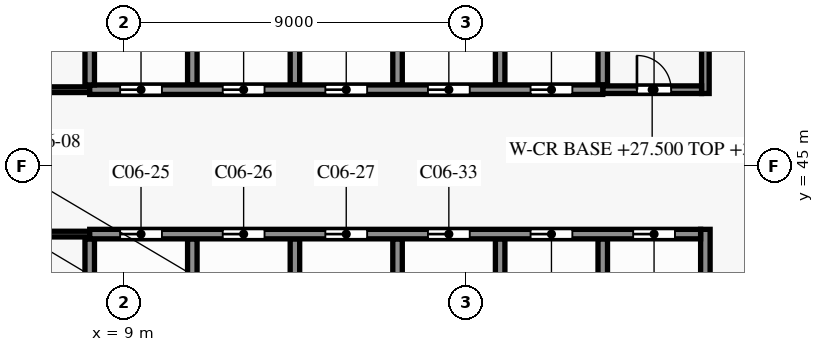
"""IFC4 building model, lengths in metres.
Left out: names, types, materials, properties, quantities, classifications, styles, units other than length and angle.
Written with IfcOpenShell. Run it as: python <this file> out.ifc"""

import sys

from ifc_helpers import new_model, si_unit, direction, frame, frame_2d, origin, place, context, subcontext, project, spatial, rectangle, extrude, element, fill, save


model = new_model("IFC4")
c1 = context("Model", 3, precision=1e-05, world=origin(), true_north=direction((0.0, 1.0)))
c2 = subcontext(c1, "Body", "Model", "MODEL_VIEW")
j1 = project(units=[si_unit("LENGTHUNIT", "METRE"), si_unit("PLANEANGLEUNIT", "RADIAN")], contexts=[c1])
p1 = place(None, origin())
s1 = spatial("IfcSite", under=j1, at=p1, CompositionType="ELEMENT")
p2 = place(p1, origin())
s2 = spatial("IfcBuilding", under=s1, at=p2, CompositionType="ELEMENT")
p3 = place(p2, frame((0.0, 0.0, 27.5)))
s3 = spatial("IfcBuildingStorey", under=s2, at=p3, CompositionType="ELEMENT", Elevation=27.5)
p4 = place(p3, frame((0.15, 43.2, 0.0), z_axis=(0.0, 0.0, 1.0), x_axis=(1.0, 0.0, 0.0)))
e1 = element("IfcWall", 1, at=p4, inside=s3, PredefinedType="PARTITIONING", context=c2, shape_type="SweptSolid", body=[
    extrude(rectangle(XDim=7.95, YDim=0.15, at=frame_2d((3.975, 0.0))), origin(), (0.0, 0.0, 1.0), 4.05),
])
p5 = place(p4, frame((1.975, 0.0, 0.0)))
e2 = element("IfcOpeningElement", 2, at=p5, cuts=e1, PredefinedType="OPENING", context=c2, shape_type="SweptSolid", body=[
    extrude(rectangle(XDim=0.9, YDim=2.1, at=frame_2d((0.45, 1.05))), frame((0.0, 0.085, 0.0), z_axis=(0.0, -1.0, 0.0), x_axis=(1.0, 0.0, 0.0)), (0.0, 0.0, 1.0), 0.17),
])
p6 = place(p4, frame((5.7, 0.0, 0.0)))
e3 = element("IfcOpeningElement", 3, at=p6, cuts=e1, PredefinedType="OPENING", context=c2, shape_type="SweptSolid", body=[
    extrude(rectangle(XDim=0.9, YDim=2.1, at=frame_2d((0.45, 1.05))), frame((0.0, 0.085, 0.0), z_axis=(0.0, -1.0, 0.0), x_axis=(1.0, 0.0, 0.0)), (0.0, 0.0, 1.0), 0.17),
])
p7 = place(p3, frame((8.1, 43.2, 0.0), z_axis=(0.0, 0.0, 1.0), x_axis=(1.0, 0.0, 0.0)))
e4 = element("IfcWall", 4, at=p7, inside=s3, PredefinedType="SHEAR", context=c2, shape_type="SweptSolid", body=[
    extrude(rectangle(XDim=16.075, YDim=0.25, at=frame_2d((8.038, 0.0))), origin(), (0.0, 0.0, 1.0), 4.2),
])
p8 = place(p7, frame((14.3, 0.0, 0.0)))
e5 = element("IfcOpeningElement", 5, at=p8, cuts=e4, PredefinedType="OPENING", context=c2, shape_type="SweptSolid", body=[
    extrude(rectangle(XDim=1.1, YDim=2.1, at=frame_2d((0.55, 1.05))), frame((0.0, 0.135, 0.0), z_axis=(0.0, -1.0, 0.0), x_axis=(1.0, 0.0, 0.0)), (0.0, 0.0, 1.0), 0.27),
])
p9 = place(p7, frame((0.8, 0.0, 0.0)))
e6 = element("IfcOpeningElement", 6, at=p9, cuts=e4, PredefinedType="OPENING", context=c2, shape_type="SweptSolid", body=[
    extrude(rectangle(XDim=1.1, YDim=2.1, at=frame_2d((0.55, 1.05))), frame((0.0, 0.135, 0.0), z_axis=(0.0, -1.0, 0.0), x_axis=(1.0, 0.0, 0.0)), (0.0, 0.0, 1.0), 0.27),
])
p10 = place(p7, frame((3.5, 0.0, 0.0)))
e7 = element("IfcOpeningElement", 7, at=p10, cuts=e4, PredefinedType="OPENING", context=c2, shape_type="SweptSolid", body=[
    extrude(rectangle(XDim=1.1, YDim=2.1, at=frame_2d((0.55, 1.05))), frame((0.0, 0.135, 0.0), z_axis=(0.0, -1.0, 0.0), x_axis=(1.0, 0.0, 0.0)), (0.0, 0.0, 1.0), 0.27),
])
p11 = place(p7, frame((6.2, 0.0, 0.0)))
e8 = element("IfcOpeningElement", 8, at=p11, cuts=e4, PredefinedType="OPENING", context=c2, shape_type="SweptSolid", body=[
    extrude(rectangle(XDim=1.1, YDim=2.1, at=frame_2d((0.55, 1.05))), frame((0.0, 0.135, 0.0), z_axis=(0.0, -1.0, 0.0), x_axis=(1.0, 0.0, 0.0)), (0.0, 0.0, 1.0), 0.27),
])
p12 = place(p7, frame((8.9, 0.0, 0.0)))
e9 = element("IfcOpeningElement", 9, at=p12, cuts=e4, PredefinedType="OPENING", context=c2, shape_type="SweptSolid", body=[
    extrude(rectangle(XDim=1.1, YDim=2.1, at=frame_2d((0.55, 1.05))), frame((0.0, 0.135, 0.0), z_axis=(0.0, -1.0, 0.0), x_axis=(1.0, 0.0, 0.0)), (0.0, 0.0, 1.0), 0.27),
])
p13 = place(p7, frame((11.6, 0.0, 0.0)))
e10 = element("IfcOpeningElement", 10, at=p13, cuts=e4, PredefinedType="OPENING", context=c2, shape_type="SweptSolid", body=[
    extrude(rectangle(XDim=1.1, YDim=2.1, at=frame_2d((0.55, 1.05))), frame((0.0, 0.135, 0.0), z_axis=(0.0, -1.0, 0.0), x_axis=(1.0, 0.0, 0.0)), (0.0, 0.0, 1.0), 0.27),
])
p14 = place(p3, frame((0.15, 47.0, 0.0), z_axis=(0.0, 0.0, 1.0), x_axis=(1.0, 0.0, 0.0)))
e11 = element("IfcWall", 11, at=p14, inside=s3, PredefinedType="PARTITIONING", context=c2, shape_type="SweptSolid", body=[
    extrude(rectangle(XDim=7.95, YDim=0.15, at=frame_2d((3.975, 0.0))), origin(), (0.0, 0.0, 1.0), 4.05),
])
p15 = place(p14, frame((1.975, 0.0, 0.0)))
e12 = element("IfcOpeningElement", 12, at=p15, cuts=e11, PredefinedType="OPENING", context=c2, shape_type="SweptSolid", body=[
    extrude(rectangle(XDim=0.9, YDim=2.1, at=frame_2d((0.45, 1.05))), frame((0.0, 0.085, 0.0), z_axis=(0.0, -1.0, 0.0), x_axis=(1.0, 0.0, 0.0)), (0.0, 0.0, 1.0), 0.17),
])
p16 = place(p14, frame((5.7, 0.0, 0.0)))
e13 = element("IfcOpeningElement", 13, at=p16, cuts=e11, PredefinedType="OPENING", context=c2, shape_type="SweptSolid", body=[
    extrude(rectangle(XDim=0.9, YDim=2.1, at=frame_2d((0.45, 1.05))), frame((0.0, 0.085, 0.0), z_axis=(0.0, -1.0, 0.0), x_axis=(1.0, 0.0, 0.0)), (0.0, 0.0, 1.0), 0.17),
])
p17 = place(p3, frame((21.6, 47.0, 0.0), z_axis=(0.0, 0.0, 1.0), x_axis=(1.0, 0.0, 0.0)))
e14 = element("IfcWall", 14, at=p17, inside=s3, PredefinedType="PARTITIONING", context=c2, shape_type="SweptSolid", body=[
    extrude(rectangle(XDim=2.6, YDim=0.2, at=frame_2d((1.3, 0.0))), origin(), (0.0, 0.0, 1.0), 4.05),
])
p18 = place(p17, frame((0.9, 0.0, 0.0)))
e15 = element("IfcOpeningElement", 15, at=p18, cuts=e14, PredefinedType="OPENING", context=c2, shape_type="SweptSolid", body=[
    extrude(rectangle(XDim=0.9, YDim=2.1, at=frame_2d((0.45, 1.05))), frame((0.0, 0.11, 0.0), z_axis=(0.0, -1.0, 0.0), x_axis=(1.0, 0.0, 0.0)), (0.0, 0.0, 1.0), 0.22),
])
p19 = place(p3, frame((8.1, 47.0, 0.0), z_axis=(0.0, 0.0, 1.0), x_axis=(1.0, 0.0, 0.0)))
e16 = element("IfcWall", 16, at=p19, inside=s3, PredefinedType="SHEAR", context=c2, shape_type="SweptSolid", body=[
    extrude(rectangle(XDim=13.5, YDim=0.25, at=frame_2d((6.75, 0.0))), origin(), (0.0, 0.0, 1.0), 4.2),
])
p20 = place(p19, frame((0.8, 0.0, 0.0)))
e17 = element("IfcOpeningElement", 17, at=p20, cuts=e16, PredefinedType="OPENING", context=c2, shape_type="SweptSolid", body=[
    extrude(rectangle(XDim=1.1, YDim=2.1, at=frame_2d((0.55, 1.05))), frame((0.0, 0.135, 0.0), z_axis=(0.0, -1.0, 0.0), x_axis=(1.0, 0.0, 0.0)), (0.0, 0.0, 1.0), 0.27),
])
p21 = place(p19, frame((3.5, 0.0, 0.0)))
e18 = element("IfcOpeningElement", 18, at=p21, cuts=e16, PredefinedType="OPENING", context=c2, shape_type="SweptSolid", body=[
    extrude(rectangle(XDim=1.1, YDim=2.1, at=frame_2d((0.55, 1.05))), frame((0.0, 0.135, 0.0), z_axis=(0.0, -1.0, 0.0), x_axis=(1.0, 0.0, 0.0)), (0.0, 0.0, 1.0), 0.27),
])
p22 = place(p19, frame((6.2, 0.0, 0.0)))
e19 = element("IfcOpeningElement", 19, at=p22, cuts=e16, PredefinedType="OPENING", context=c2, shape_type="SweptSolid", body=[
    extrude(rectangle(XDim=1.1, YDim=2.1, at=frame_2d((0.55, 1.05))), frame((0.0, 0.135, 0.0), z_axis=(0.0, -1.0, 0.0), x_axis=(1.0, 0.0, 0.0)), (0.0, 0.0, 1.0), 0.27),
])
p23 = place(p19, frame((8.9, 0.0, 0.0)))
e20 = element("IfcOpeningElement", 20, at=p23, cuts=e16, PredefinedType="OPENING", context=c2, shape_type="SweptSolid", body=[
    extrude(rectangle(XDim=1.1, YDim=2.1, at=frame_2d((0.55, 1.05))), frame((0.0, 0.135, 0.0), z_axis=(0.0, -1.0, 0.0), x_axis=(1.0, 0.0, 0.0)), (0.0, 0.0, 1.0), 0.27),
])
p24 = place(p19, frame((11.6, 0.0, 0.0)))
e21 = element("IfcOpeningElement", 21, at=p24, cuts=e16, PredefinedType="OPENING", context=c2, shape_type="SweptSolid", body=[
    extrude(rectangle(XDim=1.1, YDim=2.1, at=frame_2d((0.55, 1.05))), frame((0.0, 0.135, 0.0), z_axis=(0.0, -1.0, 0.0), x_axis=(1.0, 0.0, 0.0)), (0.0, 0.0, 1.0), 0.27),
])
for number, where, z_axis, x_axis in (
    (22, (8.1, 40.125, 0.0), (0.0, 0.0, 1.0), (0.0, 1.0, 0.0)),
    (23, (8.1, 47.125, 0.0), (0.0, 0.0, 1.0), (0.0, 1.0, 0.0)),
    (24, (10.8, 40.125, 0.0), (0.0, 0.0, 1.0), (0.0, 1.0, 0.0)),
    (25, (10.8, 47.125, 0.0), (0.0, 0.0, 1.0), (0.0, 1.0, 0.0)),
    (26, (13.5, 40.125, 0.0), (0.0, 0.0, 1.0), (0.0, 1.0, 0.0)),
    (27, (13.5, 47.125, 0.0), (0.0, 0.0, 1.0), (0.0, 1.0, 0.0)),
    (28, (16.2, 40.125, 0.0), (0.0, 0.0, 1.0), (0.0, 1.0, 0.0)),
    (29, (16.2, 47.125, 0.0), (0.0, 0.0, 1.0), (0.0, 1.0, 0.0)),
    (30, (18.9, 40.125, 0.0), (0.0, 0.0, 1.0), (0.0, 1.0, 0.0)),
    (31, (18.9, 47.125, 0.0), (0.0, 0.0, 1.0), (0.0, 1.0, 0.0)),
    (32, (21.6, 40.125, 0.0), (0.0, 0.0, 1.0), (0.0, 1.0, 0.0)),
):
    element("IfcWall", number, at=place(p3, frame(where, z_axis=z_axis, x_axis=x_axis)), inside=s3, PredefinedType="SHEAR", context=c2, shape_type="SweptSolid", body=[
        extrude(rectangle(XDim=2.95, YDim=0.25, at=frame_2d((1.475, 0.0))), origin(), (0.0, 0.0, 1.0), 4.2),
    ])
p25 = place(p3, frame((21.6, 47.125, 0.0), z_axis=(0.0, 0.0, 1.0), x_axis=(0.0, 1.0, 0.0)))
e33 = element("IfcWall", 33, at=p25, inside=s3, PredefinedType="SHEAR", context=c2, shape_type="SweptSolid", body=[
    extrude(rectangle(XDim=3.075, YDim=0.25, at=frame_2d((1.538, 0.0))), origin(), (0.0, 0.0, 1.0), 4.2),
])
p26 = place(p3, frame((24.3, 46.9, 0.0), z_axis=(0.0, 0.0, 1.0), x_axis=(0.0, 1.0, 0.0)))
e34 = element("IfcWall", 34, at=p26, inside=s3, PredefinedType="SHEAR", context=c2, shape_type="SweptSolid", body=[
    extrude(rectangle(XDim=5.0, YDim=0.2, at=frame_2d((2.5, 0.0))), origin(), (0.0, 0.0, 1.0), 4.2),
])
p27 = place(p3, frame((24.3, 40.0, 0.0), z_axis=(0.0, 0.0, 1.0), x_axis=(0.0, 1.0, 0.0)))
e35 = element("IfcWall", 35, at=p27, inside=s3, PredefinedType="SHEAR", context=c2, shape_type="SweptSolid", body=[
    extrude(rectangle(XDim=3.325, YDim=0.25, at=frame_2d((1.663, 0.0))), origin(), (0.0, 0.0, 1.0), 4.2),
])
p28 = place(p18, origin())
e36 = element("IfcDoor", 36, at=p28, inside=s3, OperationType="SINGLE_SWING_LEFT", PredefinedType="DOOR", context=c2, shape_type="SweptSolid", body=[
    extrude(rectangle(XDim=0.9, YDim=2.1, at=frame_2d((0.45, 1.05))), frame((0.0, 0.025, 0.0), z_axis=(0.0, -1.0, 0.0), x_axis=(1.0, 0.0, 0.0)), (0.0, 0.0, 1.0), 0.05),
])
fill(e15, e36)
p29 = place(p8, origin())
e37 = element("IfcDoor", 37, at=p29, inside=s3, OperationType="DOUBLE_DOOR_SLIDING", PredefinedType="DOOR", context=c2, shape_type="SweptSolid", body=[
    extrude(rectangle(XDim=1.1, YDim=2.1, at=frame_2d((0.55, 1.05))), frame((0.0, 0.025, 0.0), z_axis=(0.0, -1.0, 0.0), x_axis=(1.0, 0.0, 0.0)), (0.0, 0.0, 1.0), 0.05),
])
fill(e5, e37)
p30 = place(p9, origin())
e38 = element("IfcDoor", 38, at=p30, inside=s3, OperationType="DOUBLE_DOOR_SLIDING", PredefinedType="DOOR", context=c2, shape_type="SweptSolid", body=[
    extrude(rectangle(XDim=1.1, YDim=2.1, at=frame_2d((0.55, 1.05))), frame((0.0, 0.025, 0.0), z_axis=(0.0, -1.0, 0.0), x_axis=(1.0, 0.0, 0.0)), (0.0, 0.0, 1.0), 0.05),
])
fill(e6, e38)
p31 = place(p10, origin())
e39 = element("IfcDoor", 39, at=p31, inside=s3, OperationType="DOUBLE_DOOR_SLIDING", PredefinedType="DOOR", context=c2, shape_type="SweptSolid", body=[
    extrude(rectangle(XDim=1.1, YDim=2.1, at=frame_2d((0.55, 1.05))), frame((0.0, 0.025, 0.0), z_axis=(0.0, -1.0, 0.0), x_axis=(1.0, 0.0, 0.0)), (0.0, 0.0, 1.0), 0.05),
])
fill(e7, e39)
p32 = place(p11, origin())
e40 = element("IfcDoor", 40, at=p32, inside=s3, OperationType="DOUBLE_DOOR_SLIDING", PredefinedType="DOOR", context=c2, shape_type="SweptSolid", body=[
    extrude(rectangle(XDim=1.1, YDim=2.1, at=frame_2d((0.55, 1.05))), frame((0.0, 0.025, 0.0), z_axis=(0.0, -1.0, 0.0), x_axis=(1.0, 0.0, 0.0)), (0.0, 0.0, 1.0), 0.05),
])
fill(e8, e40)
p33 = place(p20, origin())
e41 = element("IfcDoor", 41, at=p33, inside=s3, OperationType="DOUBLE_DOOR_SLIDING", PredefinedType="DOOR", context=c2, shape_type="SweptSolid", body=[
    extrude(rectangle(XDim=1.1, YDim=2.1, at=frame_2d((0.55, 1.05))), frame((0.0, 0.025, 0.0), z_axis=(0.0, -1.0, 0.0), x_axis=(1.0, 0.0, 0.0)), (0.0, 0.0, 1.0), 0.05),
])
fill(e17, e41)
p34 = place(p21, origin())
e42 = element("IfcDoor", 42, at=p34, inside=s3, OperationType="DOUBLE_DOOR_SLIDING", PredefinedType="DOOR", context=c2, shape_type="SweptSolid", body=[
    extrude(rectangle(XDim=1.1, YDim=2.1, at=frame_2d((0.55, 1.05))), frame((0.0, 0.025, 0.0), z_axis=(0.0, -1.0, 0.0), x_axis=(1.0, 0.0, 0.0)), (0.0, 0.0, 1.0), 0.05),
])
fill(e18, e42)
p35 = place(p22, origin())
e43 = element("IfcDoor", 43, at=p35, inside=s3, OperationType="DOUBLE_DOOR_SLIDING", PredefinedType="DOOR", context=c2, shape_type="SweptSolid", body=[
    extrude(rectangle(XDim=1.1, YDim=2.1, at=frame_2d((0.55, 1.05))), frame((0.0, 0.025, 0.0), z_axis=(0.0, -1.0, 0.0), x_axis=(1.0, 0.0, 0.0)), (0.0, 0.0, 1.0), 0.05),
])
fill(e19, e43)
p36 = place(p23, origin())
e44 = element("IfcDoor", 44, at=p36, inside=s3, OperationType="DOUBLE_DOOR_SLIDING", PredefinedType="DOOR", context=c2, shape_type="SweptSolid", body=[
    extrude(rectangle(XDim=1.1, YDim=2.1, at=frame_2d((0.55, 1.05))), frame((0.0, 0.025, 0.0), z_axis=(0.0, -1.0, 0.0), x_axis=(1.0, 0.0, 0.0)), (0.0, 0.0, 1.0), 0.05),
])
fill(e20, e44)
p37 = place(p24, origin())
e45 = element("IfcDoor", 45, at=p37, inside=s3, OperationType="DOUBLE_DOOR_SLIDING", PredefinedType="DOOR", context=c2, shape_type="SweptSolid", body=[
    extrude(rectangle(XDim=1.1, YDim=2.1, at=frame_2d((0.55, 1.05))), frame((0.0, 0.025, 0.0), z_axis=(0.0, -1.0, 0.0), x_axis=(1.0, 0.0, 0.0)), (0.0, 0.0, 1.0), 0.05),
])
fill(e21, e45)
p38 = place(p12, origin())
e46 = element("IfcDoor", 46, at=p38, inside=s3, OperationType="DOUBLE_DOOR_SLIDING", PredefinedType="DOOR", context=c2, shape_type="SweptSolid", body=[
    extrude(rectangle(XDim=1.1, YDim=2.1, at=frame_2d((0.55, 1.05))), frame((0.0, 0.025, 0.0), z_axis=(0.0, -1.0, 0.0), x_axis=(1.0, 0.0, 0.0)), (0.0, 0.0, 1.0), 0.05),
])
fill(e9, e46)
p39 = place(p13, origin())
e47 = element("IfcDoor", 47, at=p39, inside=s3, OperationType="DOUBLE_DOOR_SLIDING", PredefinedType="DOOR", context=c2, shape_type="SweptSolid", body=[
    extrude(rectangle(XDim=1.1, YDim=2.1, at=frame_2d((0.55, 1.05))), frame((0.0, 0.025, 0.0), z_axis=(0.0, -1.0, 0.0), x_axis=(1.0, 0.0, 0.0)), (0.0, 0.0, 1.0), 0.05),
])
fill(e10, e47)
save(model, sys.argv[1])
